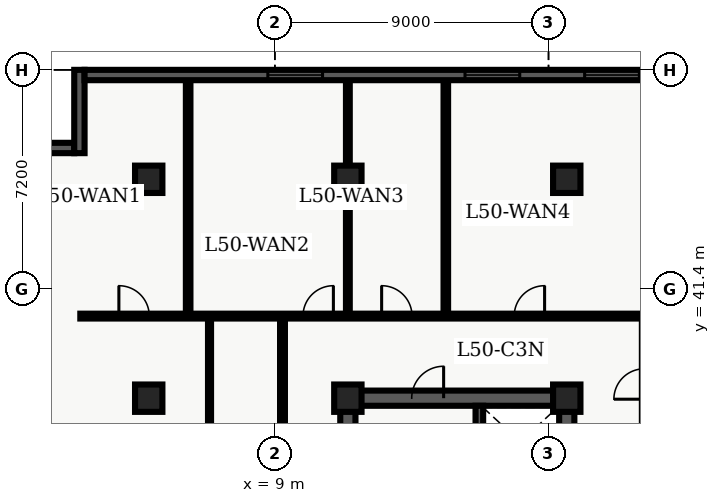
"""IFC4 building model, lengths in metres.
Left out: names, types, materials, properties, quantities, classifications, styles, units other than length and angle.
Written with IfcOpenShell. Run it as: python <this file> out.ifc"""

import sys

from ifc_helpers import new_model, entity, si_unit, converted_unit, direction, frame, origin_with_axes, origin_2d_with_axis, place, context, subcontext, project, spatial, polyline, rectangle, outline, extrude, element, fill, save


model = new_model("IFC4")
c1 = context("Model", 3, precision=1e-05, world=origin_with_axes(), true_north=direction((0.0, 1.0)))
c2 = subcontext(c1, "Body", "Model", "MODEL_VIEW")
j1 = project(units=[si_unit("LENGTHUNIT", "METRE"), converted_unit("PLANEANGLEUNIT", "DEGREE", entity("IfcPlaneAngleMeasure", 0.017), si_unit("PLANEANGLEUNIT", "RADIAN"), dimensions=[0, 0, 0, 0, 0, 0, 0])], contexts=[c1])
p1 = place(None, origin_with_axes())
s1 = spatial("IfcSite", under=j1, at=p1, CompositionType="ELEMENT")
p2 = place(p1, origin_with_axes())
s2 = spatial("IfcBuilding", under=s1, at=p2, CompositionType="ELEMENT")
p3 = place(p2, frame((0.0, 0.0, 204.3), z_axis=(0.0, 0.0, 1.0), x_axis=(1.0, 0.0, 0.0)))
s3 = spatial("IfcBuildingStorey", under=s2, at=p3, CompositionType="ELEMENT", Elevation=204.3)
p4 = place(p3, frame((11.4, 10.8, 0.0), z_axis=(0.0, 0.0, 1.0), x_axis=(0.0, 1.0, 0.0)))
e1 = element("IfcWall", 1, at=p4, inside=s3, PredefinedType="SHEAR", context=c2, shape_type="SweptSolid", body=[
    extrude(outline(polyline([(0.0, -0.25), (27.0, -0.25), (27.0, 0.25), (0.0, 0.25), (0.0, -0.25)])), origin_with_axes(), (0.0, 0.0, 1.0), 3.66),
])
p5 = place(p3, frame((11.4, 37.8, 0.0), z_axis=(0.0, 0.0, 1.0), x_axis=(1.0, 0.0, 0.0)))
e2 = element("IfcWall", 2, at=p5, inside=s3, PredefinedType="SHEAR", context=c2, shape_type="SweptSolid", body=[
    extrude(outline(polyline([(0.0, -0.25), (7.2, -0.25), (7.2, 0.25), (0.0, 0.25), (0.0, -0.25)])), origin_with_axes(), (0.0, 0.0, 1.0), 3.66),
])
p6 = place(p5, frame((2.625, 0.0, 0.0), z_axis=(0.0, 0.0, 1.0), x_axis=(1.0, 0.0, 0.0)))
e3 = element("IfcOpeningElement", 3, at=p6, cuts=e2, PredefinedType="OPENING", context=c2, shape_type="SweptSolid", body=[
    extrude(rectangle(XDim=1.05, YDim=0.52, at=origin_2d_with_axis()), origin_with_axes(), (0.0, 0.0, 1.0), 2.15),
])
p7 = place(p3, frame((18.6, 24.3, 0.0), z_axis=(0.0, 0.0, 1.0), x_axis=(0.0, 1.0, 0.0)))
e4 = element("IfcWall", 4, at=p7, inside=s3, PredefinedType="SHEAR", context=c2, shape_type="SweptSolid", body=[
    extrude(outline(polyline([(0.0, -0.25), (13.5, -0.25), (13.5, 0.25), (0.0, 0.25), (0.0, -0.25)])), origin_with_axes(), (0.0, 0.0, 1.0), 3.66),
])
p8 = place(p7, frame((5.65, 0.0, 0.0), z_axis=(0.0, 0.0, 1.0), x_axis=(1.0, 0.0, 0.0)))
e5 = element("IfcOpeningElement", 5, at=p8, cuts=e4, PredefinedType="OPENING", context=c2, shape_type="SweptSolid", body=[
    extrude(rectangle(XDim=1.1, YDim=0.52, at=origin_2d_with_axis()), origin_with_axes(), (0.0, 0.0, 1.0), 2.15),
])
p9 = place(p7, frame((7.75, 0.0, 0.0), z_axis=(0.0, 0.0, 1.0), x_axis=(1.0, 0.0, 0.0)))
e6 = element("IfcOpeningElement", 6, at=p9, cuts=e4, PredefinedType="OPENING", context=c2, shape_type="SweptSolid", body=[
    extrude(rectangle(XDim=1.1, YDim=0.52, at=origin_2d_with_axis()), origin_with_axes(), (0.0, 0.0, 1.0), 2.15),
])
p10 = place(p3, frame((15.725, 28.9, 0.0), z_axis=(0.0, 0.0, 1.0), x_axis=(0.0, 1.0, 0.0)))
e7 = element("IfcWall", 7, at=p10, inside=s3, PredefinedType="SHEAR", context=c2, shape_type="SweptSolid", body=[
    extrude(outline(polyline([(0.0, -0.125), (8.65, -0.125), (8.65, 0.125), (0.0, 0.125), (0.0, -0.125)])), origin_with_axes(), (0.0, 0.0, 1.0), 3.66),
])
for number, where, z_axis, x_axis in (
    (8, (11.4, 37.8, 0.0), (0.0, 0.0, 1.0), (1.0, 0.0, 0.0)),
    (9, (11.4, 45.0, 0.0), (0.0, 0.0, 1.0), (1.0, 0.0, 0.0)),
    (10, (18.6, 37.8, 0.0), (0.0, 0.0, 1.0), (1.0, 0.0, 0.0)),
    (11, (18.6, 45.0, 0.0), (0.0, 0.0, 1.0), (1.0, 0.0, 0.0)),
    (12, (4.85, 37.8, 0.0), (0.0, 0.0, 1.0), (1.0, 0.0, 0.0)),
    (13, (4.85, 45.0, 0.0), (0.0, 0.0, 1.0), (1.0, 0.0, 0.0)),
):
    element("IfcColumn", number, at=place(p3, frame(where, z_axis=z_axis, x_axis=x_axis)), inside=s3, PredefinedType="COLUMN", context=c2, shape_type="SweptSolid", body=[
        extrude(rectangle(XDim=0.9, YDim=0.9, at=origin_2d_with_axis()), origin_with_axes(), (0.0, 0.0, 1.0), 3.9),
    ])
p11 = place(p3, frame((2.6, 40.5, 0.0), z_axis=(0.0, 0.0, 1.0), x_axis=(1.0, 0.0, 0.0)))
e14 = element("IfcWall", 14, at=p11, inside=s3, PredefinedType="PARTITIONING", context=c2, shape_type="SweptSolid", body=[
    extrude(outline(polyline([(0.0, -0.08), (26.946, -0.08), (26.946, 0.08), (0.0, 0.08), (0.0, -0.08)])), origin_with_axes(), (0.0, 0.0, 1.0), 2.7),
])
p12 = place(p11, frame((1.768, 0.0, 0.0), z_axis=(0.0, 0.0, 1.0), x_axis=(1.0, 0.0, 0.0)))
e15 = element("IfcOpeningElement", 15, at=p12, cuts=e14, PredefinedType="OPENING", context=c2, shape_type="SweptSolid", body=[
    extrude(rectangle(XDim=1.0, YDim=0.18, at=origin_2d_with_axis()), origin_with_axes(), (0.0, 0.0, 1.0), 2.15),
])
p13 = place(p11, frame((7.824, 0.0, 0.0), z_axis=(0.0, 0.0, 1.0), x_axis=(1.0, 0.0, 0.0)))
e16 = element("IfcOpeningElement", 16, at=p13, cuts=e14, PredefinedType="OPENING", context=c2, shape_type="SweptSolid", body=[
    extrude(rectangle(XDim=1.0, YDim=0.18, at=origin_2d_with_axis()), origin_with_axes(), (0.0, 0.0, 1.0), 2.15),
])
p14 = place(p11, frame((10.411, 0.0, 0.0), z_axis=(0.0, 0.0, 1.0), x_axis=(1.0, 0.0, 0.0)))
e17 = element("IfcOpeningElement", 17, at=p14, cuts=e14, PredefinedType="OPENING", context=c2, shape_type="SweptSolid", body=[
    extrude(rectangle(XDim=1.0, YDim=0.18, at=origin_2d_with_axis()), origin_with_axes(), (0.0, 0.0, 1.0), 2.15),
])
p15 = place(p11, frame((14.771, 0.0, 0.0), z_axis=(0.0, 0.0, 1.0), x_axis=(1.0, 0.0, 0.0)))
e18 = element("IfcOpeningElement", 18, at=p15, cuts=e14, PredefinedType="OPENING", context=c2, shape_type="SweptSolid", body=[
    extrude(rectangle(XDim=1.0, YDim=0.18, at=origin_2d_with_axis()), origin_with_axes(), (0.0, 0.0, 1.0), 2.15),
])
p16 = place(p3, frame((9.25, 24.4, 0.0), z_axis=(0.0, 0.0, 1.0), x_axis=(0.0, 1.0, 0.0)))
e19 = element("IfcWall", 19, at=p16, inside=s3, PredefinedType="PARTITIONING", context=c2, shape_type="SweptSolid", body=[
    extrude(outline(polyline([(0.0, -0.08), (16.1, -0.08), (16.1, 0.08), (0.0, 0.08), (0.0, -0.08)])), origin_with_axes(), (0.0, 0.0, 1.0), 2.7),
])
p17 = place(p16, frame((3.567, 0.0, 0.0), z_axis=(0.0, 0.0, 1.0), x_axis=(1.0, 0.0, 0.0)))
e20 = element("IfcOpeningElement", 20, at=p17, cuts=e19, PredefinedType="OPENING", context=c2, shape_type="SweptSolid", body=[
    extrude(rectangle(XDim=1.0, YDim=0.18, at=origin_2d_with_axis()), origin_with_axes(), (0.0, 0.0, 1.0), 2.15),
])
p18 = place(p16, frame((11.512, 0.0, 0.0), z_axis=(0.0, 0.0, 1.0), x_axis=(1.0, 0.0, 0.0)))
e21 = element("IfcOpeningElement", 21, at=p18, cuts=e19, PredefinedType="OPENING", context=c2, shape_type="SweptSolid", body=[
    extrude(rectangle(XDim=1.0, YDim=0.18, at=origin_2d_with_axis()), origin_with_axes(), (0.0, 0.0, 1.0), 2.15),
])
p19 = place(p3, frame((6.85, 24.55, 0.0), z_axis=(0.0, 0.0, 1.0), x_axis=(0.0, 1.0, 0.0)))
e22 = element("IfcWall", 22, at=p19, inside=s3, PredefinedType="PARTITIONING", context=c2, shape_type="SweptSolid", body=[
    extrude(outline(polyline([(0.0, -0.05), (15.75, -0.05), (15.75, 0.05), (0.0, 0.05), (0.0, -0.05)])), origin_with_axes(), (0.0, 0.0, 1.0), 2.7),
])
p20 = place(p19, frame((3.417, 0.0, 0.0), z_axis=(0.0, 0.0, 1.0), x_axis=(1.0, 0.0, 0.0)))
e23 = element("IfcOpeningElement", 23, at=p20, cuts=e22, PredefinedType="OPENING", context=c2, shape_type="SweptSolid", body=[
    extrude(rectangle(XDim=0.95, YDim=0.12, at=origin_2d_with_axis()), origin_with_axes(), (0.0, 0.0, 1.0), 2.15),
])
p21 = place(p19, frame((11.363, 0.0, 0.0), z_axis=(0.0, 0.0, 1.0), x_axis=(1.0, 0.0, 0.0)))
e24 = element("IfcOpeningElement", 24, at=p21, cuts=e22, PredefinedType="OPENING", context=c2, shape_type="SweptSolid", body=[
    extrude(rectangle(XDim=0.95, YDim=0.12, at=origin_2d_with_axis()), origin_with_axes(), (0.0, 0.0, 1.0), 2.15),
])
p22 = place(p3, frame((6.147, 40.6, 0.0), z_axis=(0.0, 0.0, 1.0), x_axis=(0.0, 1.0, 0.0)))
e25 = element("IfcWall", 25, at=p22, inside=s3, PredefinedType="PARTITIONING", context=c2, shape_type="SweptSolid", body=[
    extrude(outline(polyline([(0.0, -0.075), (7.665, -0.075), (7.665, 0.075), (0.0, 0.075), (0.0, -0.075)])), origin_with_axes(), (0.0, 0.0, 1.0), 2.7),
])
p23 = place(p3, frame((11.4, 40.6, 0.0), z_axis=(0.0, 0.0, 1.0), x_axis=(0.0, 1.0, 0.0)))
e26 = element("IfcWall", 26, at=p23, inside=s3, PredefinedType="PARTITIONING", context=c2, shape_type="SweptSolid", body=[
    extrude(outline(polyline([(0.0, -0.062), (7.665, -0.062), (7.665, 0.062), (0.0, 0.062), (0.0, -0.062)])), origin_with_axes(), (0.0, 0.0, 1.0), 2.7),
])
p24 = place(p3, frame((14.622, 40.6, 0.0), z_axis=(0.0, 0.0, 1.0), x_axis=(0.0, 1.0, 0.0)))
e27 = element("IfcWall", 27, at=p24, inside=s3, PredefinedType="PARTITIONING", context=c2, shape_type="SweptSolid", body=[
    extrude(outline(polyline([(0.0, -0.075), (7.665, -0.075), (7.665, 0.075), (0.0, 0.075), (0.0, -0.075)])), origin_with_axes(), (0.0, 0.0, 1.0), 2.7),
])
p25 = place(p3, frame((0.34, 46.03, 0.0), z_axis=(0.0, 0.0, 1.0), x_axis=(1.0, 0.0, 0.0)))
e28 = element("IfcWall", 28, at=p25, inside=s3, PredefinedType="SOLIDWALL", context=c2, shape_type="SweptSolid", body=[
    extrude(outline(polyline([(0.0, -0.17), (2.06, -0.17), (2.06, 0.17), (0.0, 0.17), (0.0, -0.17)])), origin_with_axes(), (0.0, 0.0, 1.0), 3.66),
])
p26 = place(p3, frame((2.57, 45.86, 0.0), z_axis=(0.0, 0.0, 1.0), x_axis=(0.0, 1.0, 0.0)))
e29 = element("IfcWall", 29, at=p26, inside=s3, PredefinedType="SOLIDWALL", context=c2, shape_type="SweptSolid", body=[
    extrude(outline(polyline([(0.0, -0.17), (2.74, -0.17), (2.74, 0.17), (0.0, 0.17), (0.0, -0.17)])), origin_with_axes(), (0.0, 0.0, 1.0), 3.66),
])
p27 = place(p3, frame((2.74, 48.43, 0.0), z_axis=(0.0, 0.0, 1.0), x_axis=(1.0, 0.0, 0.0)))
e30 = element("IfcWall", 30, at=p27, inside=s3, PredefinedType="SOLIDWALL", context=c2, shape_type="SweptSolid", body=[
    extrude(outline(polyline([(0.0, -0.17), (20.341, -0.17), (20.341, 0.17), (0.0, 0.17), (0.0, -0.17)])), origin_with_axes(), (0.0, 0.0, 1.0), 3.66),
])
p28 = place(p27, frame((6.928, 0.0, 0.45), z_axis=(0.0, 0.0, 1.0), x_axis=(1.0, 0.0, 0.0)))
e31 = element("IfcOpeningElement", 31, at=p28, cuts=e30, PredefinedType="OPENING", context=c2, shape_type="SweptSolid", body=[
    extrude(rectangle(XDim=1.8, YDim=0.36, at=origin_2d_with_axis()), origin_with_axes(), (0.0, 0.0, 1.0), 2.1),
])
p29 = place(p27, frame((13.413, 0.0, 0.45), z_axis=(0.0, 0.0, 1.0), x_axis=(1.0, 0.0, 0.0)))
e32 = element("IfcOpeningElement", 32, at=p29, cuts=e30, PredefinedType="OPENING", context=c2, shape_type="SweptSolid", body=[
    extrude(rectangle(XDim=1.8, YDim=0.36, at=origin_2d_with_axis()), origin_with_axes(), (0.0, 0.0, 1.0), 2.1),
])
p30 = place(p27, frame((17.348, 0.0, 0.45), z_axis=(0.0, 0.0, 1.0), x_axis=(1.0, 0.0, 0.0)))
e33 = element("IfcOpeningElement", 33, at=p30, cuts=e30, PredefinedType="OPENING", context=c2, shape_type="SweptSolid", body=[
    extrude(rectangle(XDim=1.8, YDim=0.36, at=origin_2d_with_axis()), origin_with_axes(), (0.0, 0.0, 1.0), 2.1),
])
p31 = place(p5, frame((2.625, 0.0, 0.0), z_axis=(0.0, 0.0, 1.0), x_axis=(1.0, 0.0, 0.0)))
e34 = element("IfcDoor", 34, at=p31, inside=s3, OperationType="SINGLE_SWING_RIGHT", PredefinedType="DOOR", context=c2, shape_type="SweptSolid", body=[
    extrude(rectangle(XDim=1.05, YDim=0.09, at=origin_2d_with_axis()), origin_with_axes(), (0.0, 0.0, 1.0), 2.15),
])
fill(e3, e34)
p32 = place(p11, frame((1.768, 0.0, 0.0), z_axis=(0.0, 0.0, 1.0), x_axis=(1.0, 0.0, 0.0)))
e35 = element("IfcDoor", 35, at=p32, inside=s3, OperationType="SINGLE_SWING_LEFT", PredefinedType="DOOR", context=c2, shape_type="SweptSolid", body=[
    extrude(rectangle(XDim=1.0, YDim=0.09, at=origin_2d_with_axis()), origin_with_axes(), (0.0, 0.0, 1.0), 2.15),
])
fill(e15, e35)
p33 = place(p11, frame((7.824, 0.0, 0.0), z_axis=(0.0, 0.0, 1.0), x_axis=(1.0, 0.0, 0.0)))
e36 = element("IfcDoor", 36, at=p33, inside=s3, OperationType="SINGLE_SWING_RIGHT", PredefinedType="DOOR", context=c2, shape_type="SweptSolid", body=[
    extrude(rectangle(XDim=1.0, YDim=0.09, at=origin_2d_with_axis()), origin_with_axes(), (0.0, 0.0, 1.0), 2.15),
])
fill(e16, e36)
p34 = place(p11, frame((10.411, 0.0, 0.0), z_axis=(0.0, 0.0, 1.0), x_axis=(1.0, 0.0, 0.0)))
e37 = element("IfcDoor", 37, at=p34, inside=s3, OperationType="SINGLE_SWING_LEFT", PredefinedType="DOOR", context=c2, shape_type="SweptSolid", body=[
    extrude(rectangle(XDim=1.0, YDim=0.09, at=origin_2d_with_axis()), origin_with_axes(), (0.0, 0.0, 1.0), 2.15),
])
fill(e17, e37)
p35 = place(p11, frame((14.771, 0.0, 0.0), z_axis=(0.0, 0.0, 1.0), x_axis=(1.0, 0.0, 0.0)))
e38 = element("IfcDoor", 38, at=p35, inside=s3, OperationType="SINGLE_SWING_RIGHT", PredefinedType="DOOR", context=c2, shape_type="SweptSolid", body=[
    extrude(rectangle(XDim=1.0, YDim=0.09, at=origin_2d_with_axis()), origin_with_axes(), (0.0, 0.0, 1.0), 2.15),
])
fill(e18, e38)
p36 = place(p27, frame((6.928, 0.0, 0.45), z_axis=(0.0, 0.0, 1.0), x_axis=(1.0, 0.0, 0.0)))
e39 = element("IfcWindow", 39, at=p36, inside=s3, PredefinedType="WINDOW", context=c2, shape_type="SweptSolid", body=[
    extrude(rectangle(XDim=1.8, YDim=0.09, at=origin_2d_with_axis()), origin_with_axes(), (0.0, 0.0, 1.0), 2.1),
])
fill(e31, e39)
p37 = place(p27, frame((13.413, 0.0, 0.45), z_axis=(0.0, 0.0, 1.0), x_axis=(1.0, 0.0, 0.0)))
e40 = element("IfcWindow", 40, at=p37, inside=s3, PredefinedType="WINDOW", context=c2, shape_type="SweptSolid", body=[
    extrude(rectangle(XDim=1.8, YDim=0.09, at=origin_2d_with_axis()), origin_with_axes(), (0.0, 0.0, 1.0), 2.1),
])
fill(e32, e40)
p38 = place(p27, frame((17.348, 0.0, 0.45), z_axis=(0.0, 0.0, 1.0), x_axis=(1.0, 0.0, 0.0)))
e41 = element("IfcWindow", 41, at=p38, inside=s3, PredefinedType="WINDOW", context=c2, shape_type="SweptSolid", body=[
    extrude(rectangle(XDim=1.8, YDim=0.09, at=origin_2d_with_axis()), origin_with_axes(), (0.0, 0.0, 1.0), 2.1),
])
fill(e33, e41)
save(model, sys.argv[1])
